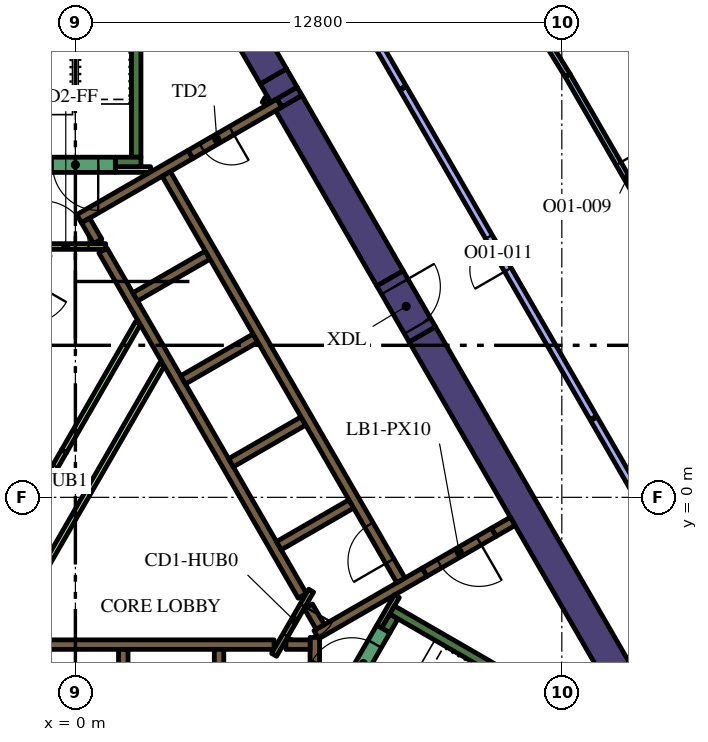
"""IFC4 building model, lengths in metres.
Left out: names, types, materials, properties, quantities, classifications, styles, units other than length and angle.
Written with IfcOpenShell. Run it as: python <this file> out.ifc"""

import sys

from ifc_helpers import new_model, si_unit, direction, frame, frame_2d, origin, place, context, subcontext, project, spatial, polyline, rectangle, outline, extrude, element, fill, save


model = new_model("IFC4")
c1 = context("Model", 3, precision=1e-05, world=origin(), true_north=direction((0.0, 1.0)))
c2 = subcontext(c1, "Body", "Model", "MODEL_VIEW")
j1 = project(units=[si_unit("LENGTHUNIT", "METRE"), si_unit("PLANEANGLEUNIT", "RADIAN")], contexts=[c1])
p1 = place(None, origin())
s1 = spatial("IfcSite", under=j1, at=p1, CompositionType="ELEMENT")
p2 = place(p1, origin())
s2 = spatial("IfcBuilding", under=s1, at=p2, CompositionType="ELEMENT")
p3 = place(p2, frame((0.0, 0.0, 150.0)))
s3 = spatial("IfcBuildingStorey", under=s2, at=p3, CompositionType="ELEMENT", Elevation=150.0)
p4 = place(p3, frame((9.129, 4.289, 0.0), z_axis=(0.0, 0.0, 1.0), x_axis=(0.499995742806, -0.866027861663, 0.0)))
e1 = element("IfcWall", 1, at=p4, inside=s3, PredefinedType="SOLIDWALL", context=c2, shape_type="SweptSolid", body=[
    extrude(rectangle(XDim=12.527, YDim=0.8, at=frame_2d((6.264, 0.0))), origin(), (0.0, 0.0, 1.0), 4.2),
])
p5 = place(p3, frame((5.489, 10.594, 0.0), z_axis=(0.0, 0.0, 1.0), x_axis=(-0.500000383388, 0.866025182435, 0.0)))
e2 = element("IfcWall", 2, at=p5, inside=s3, PredefinedType="SOLIDWALL", context=c2, shape_type="SweptSolid", body=[
    extrude(rectangle(XDim=0.558, YDim=0.8, at=frame_2d((0.279, 0.0))), origin(), (0.0, 0.0, 1.0), 4.2),
])
p6 = place(p3, frame((5.615, 10.375, 0.0), z_axis=(0.0, 0.0, 1.0), x_axis=(0.500002746266, -0.866023818221, 0.0)))
e3 = element("IfcWall", 3, at=p6, inside=s3, PredefinedType="SOLIDWALL", context=c2, shape_type="SweptSolid", body=[
    extrude(rectangle(XDim=5.328, YDim=0.8, at=frame_2d((2.664, 0.0))), origin(), (0.0, 0.0, 1.0), 4.2),
])
p7 = place(p3, origin())
e4 = element("IfcWall", 4, at=p7, inside=s3, PredefinedType="SOLIDWALL", context=c2, shape_type="SweptSolid", body=[
    extrude(outline(polyline([(5.432, 10.272), (5.308, 10.487), (5.836, 10.792), (5.96, 10.577), (5.432, 10.272)])), origin(), (0.0, 0.0, 1.0), 4.2),
])
p8 = place(p3, frame((5.209, 11.078, 0.0), z_axis=(0.0, 0.0, 1.0), x_axis=(-0.500035624827, 0.866004834804, 0.0)))
e5 = element("IfcWall", 5, at=p8, inside=s3, PredefinedType="SOLIDWALL", context=c2, shape_type="SweptSolid", body=[
    extrude(rectangle(XDim=6.388, YDim=0.8, at=frame_2d((3.194, 0.0))), origin(), (0.0, 0.0, 1.0), 4.2),
])
p9 = place(p3, frame((8.334, -2.964, 0.0), z_axis=(0.0, 0.0, 1.0), x_axis=(0.866016039709, -0.500016218704, 0.0)))
e6 = element("IfcWall", 6, at=p9, inside=s3, PredefinedType="SOLIDWALL", context=c2, shape_type="SweptSolid", body=[
    extrude(rectangle(XDim=7.05, YDim=0.25, at=frame_2d((3.525, 0.0))), origin(), (0.0, 0.0, 1.0), 4.2),
])
p10 = place(p3, frame((8.168, -3.503, 0.0), z_axis=(0.0, 0.0, 1.0), x_axis=(0.49972245349, 0.866185586049, 0.0)))
e7 = element("IfcWall", 7, at=p10, inside=s3, PredefinedType="SOLIDWALL", context=c2, shape_type="SweptSolid", body=[
    extrude(rectangle(XDim=0.425, YDim=0.25, at=frame_2d((0.212, 0.0))), origin(), (0.0, 0.0, 1.0), 4.2),
])
p11 = place(p3, frame((1.6, 8.95, 0.0), z_axis=(0.0, 0.0, 1.0), x_axis=(0.0, 1.0, 0.0)))
e8 = element("IfcWall", 8, at=p11, inside=s3, PredefinedType="SOLIDWALL", context=c2, shape_type="SweptSolid", body=[
    extrude(rectangle(XDim=6.8, YDim=0.25, at=frame_2d((3.4, 0.0))), origin(), (0.0, 0.0, 1.0), 4.2),
])
p12 = place(p3, frame((1.05, 8.825, 0.0), z_axis=(0.0, 0.0, 1.0), x_axis=(1.0, 0.0, 0.0)))
e9 = element("IfcWall", 9, at=p12, inside=s3, PredefinedType="SOLIDWALL", context=c2, shape_type="SweptSolid", body=[
    extrude(rectangle(XDim=0.675, YDim=0.25, at=frame_2d((0.337, 0.0))), origin(), (0.0, 0.0, 1.0), 4.2),
])
p13 = place(p3, frame((-5.259, -3.875, 0.0), z_axis=(0.0, 0.0, 1.0), x_axis=(1.0, 0.0, 0.0)))
e10 = element("IfcWall", 10, at=p13, inside=s3, PredefinedType="SOLIDWALL", context=c2, shape_type="SweptSolid", body=[
    extrude(rectangle(XDim=10.489, YDim=0.25, at=frame_2d((5.244, 0.0))), origin(), (0.0, 0.0, 1.0), 4.2),
])
for number, where, z_axis, x_axis in (
    (11, (3.78, -4.0, 0.0), (0.0, 0.0, 1.0), (0.0, -1.0, 0.0)),
    (12, (1.26, -4.0, 0.0), (0.0, 0.0, 1.0), (0.0, -1.0, 0.0)),
):
    element("IfcWall", number, at=place(p3, frame(where, z_axis=z_axis, x_axis=x_axis)), inside=s3, PredefinedType="SOLIDWALL", context=c2, shape_type="SweptSolid", body=[
        extrude(rectangle(XDim=2.2, YDim=0.25, at=frame_2d((1.1, 0.0))), origin(), (0.0, 0.0, 1.0), 4.2),
    ])
p14 = place(p3, frame((6.3, -7.24, 0.0), z_axis=(0.0, 0.0, 1.0), x_axis=(0.0, 1.0, 0.0)))
e13 = element("IfcWall", 13, at=p14, inside=s3, PredefinedType="SOLIDWALL", context=c2, shape_type="SweptSolid", body=[
    extrude(rectangle(XDim=3.556, YDim=0.25, at=frame_2d((1.778, 0.0))), origin(), (0.0, 0.0, 1.0), 4.2),
])
p15 = place(p3, frame((5.538, -3.875, 0.0), z_axis=(0.0, 0.0, 1.0), x_axis=(1.0, 0.0, 0.0)))
e14 = element("IfcWall", 14, at=p15, inside=s3, PredefinedType="SOLIDWALL", context=c2, shape_type="SweptSolid", body=[
    extrude(rectangle(XDim=0.637, YDim=0.25, at=frame_2d((0.318, 0.0))), origin(), (0.0, 0.0, 1.0), 4.2),
])
p16 = place(p3, frame((9.19, -1.969, 0.0), z_axis=(0.0, 0.0, 1.0), x_axis=(-0.866057109641, -0.499945079824, 0.0)))
e15 = element("IfcWall", 15, at=p16, inside=s3, PredefinedType="SOLIDWALL", context=c2, shape_type="SweptSolid", body=[
    extrude(rectangle(XDim=3.291, YDim=0.25, at=frame_2d((1.646, 0.0))), origin(), (0.0, 0.0, 1.0), 4.2),
])
p17 = place(p3, frame((6.13, -2.867, 0.0), z_axis=(0.0, 0.0, 1.0), x_axis=(0.500160776593, -0.865932559475, 0.0)))
e16 = element("IfcWall", 16, at=p17, inside=s3, PredefinedType="SOLIDWALL", context=c2, shape_type="SweptSolid", body=[
    extrude(rectangle(XDim=0.627, YDim=0.25, at=frame_2d((0.313, 0.0))), origin(), (0.0, 0.0, 1.0), 4.2),
])
p18 = place(p3, frame((11.507, -0.631, 0.0), z_axis=(0.0, 0.0, 1.0), x_axis=(-0.866093731455, -0.499881634324, 0.0)))
e17 = element("IfcWall", 17, at=p18, inside=s3, PredefinedType="SOLIDWALL", context=c2, shape_type="SweptSolid", body=[
    extrude(rectangle(XDim=0.575, YDim=0.25, at=frame_2d((0.288, 0.0))), origin(), (0.0, 0.0, 1.0), 4.2),
])
p19 = place(p3, frame((3.028, 9.023, 0.0), z_axis=(0.0, 0.0, 1.0), x_axis=(-0.866036587186, -0.49998062928, 0.0)))
e18 = element("IfcWall", 18, at=p19, inside=s3, PredefinedType="SOLIDWALL", context=c2, shape_type="SweptSolid", body=[
    extrude(rectangle(XDim=3.384, YDim=0.25, at=frame_2d((1.692, 0.0))), origin(), (0.0, 0.0, 1.0), 4.2),
])
p20 = place(p3, frame((0.268, 7.285, 0.0), z_axis=(0.0, 0.0, 1.0), x_axis=(0.500098681536, -0.865968422476, 0.0)))
e19 = element("IfcWall", 19, at=p20, inside=s3, PredefinedType="SOLIDWALL", context=c2, shape_type="SweptSolid", body=[
    extrude(rectangle(XDim=0.636, YDim=0.25, at=frame_2d((0.318, 0.0))), origin(), (0.0, 0.0, 1.0), 4.2),
])
p21 = place(p3, frame((5.97, -2.591, 0.0), z_axis=(0.0, 0.0, 1.0), x_axis=(-0.499994469932, 0.866028596547, 0.0)))
e20 = element("IfcWall", 20, at=p21, inside=s3, PredefinedType="SOLIDWALL", context=c2, shape_type="SweptSolid", body=[
    extrude(rectangle(XDim=10.488, YDim=0.25, at=frame_2d((5.244, 0.0))), origin(), (0.0, 0.0, 1.0), 4.2),
])
p22 = place(p3, frame((1.574, 5.274, 0.0), z_axis=(0.0, 0.0, 1.0), x_axis=(0.866028486751, 0.499994660107, 0.0)))
e21 = element("IfcWall", 21, at=p22, inside=s3, PredefinedType="SOLIDWALL", context=c2, shape_type="SweptSolid", body=[
    extrude(rectangle(XDim=2.2, YDim=0.25, at=frame_2d((1.1, 0.0))), origin(), (0.0, 0.0, 1.0), 4.2),
])
for number, where, z_axis, x_axis in (
    (22, (2.834, 3.091, 0.0), (0.0, 0.0, 1.0), (0.866, 0.5, 0.0)),
    (23, (4.094, 0.909, 0.0), (0.0, 0.0, 1.0), (0.866, 0.5, 0.0)),
    (24, (5.354, -1.274, 0.0), (0.0, 0.0, 1.0), (0.866, 0.5, 0.0)),
):
    element("IfcWall", number, at=place(p3, frame(where, z_axis=z_axis, x_axis=x_axis)), inside=s3, PredefinedType="SOLIDWALL", context=c2, shape_type="SweptSolid", body=[
        extrude(rectangle(XDim=2.2, YDim=0.25, at=frame_2d((1.1, 0.0))), origin(), (0.0, 0.0, 1.0), 4.2),
    ])
p23 = place(p3, frame((1.05, 8.625, 0.0), z_axis=(0.0, 0.0, 1.0), x_axis=(1.0, 0.0, 0.0)))
e25 = element("IfcWall", 25, at=p23, inside=s3, PredefinedType="PARTITIONING", context=c2, shape_type="SweptSolid", body=[
    extrude(rectangle(XDim=0.929, YDim=0.15, at=frame_2d((0.464, 0.0))), origin(), (0.0, 0.0, 1.0), 3.15),
])
p24 = place(p3, frame((4.98, 10.358, 0.0), z_axis=(0.0, 0.0, 1.0), x_axis=(0.500640202437, 0.86565546709, 0.0)))
e26 = element("IfcWall", 26, at=p24, inside=s3, PredefinedType="PARTITIONING", context=c2, shape_type="SweptSolid", body=[
    extrude(rectangle(XDim=0.146, YDim=0.15, at=frame_2d((0.073, 0.0))), origin(), (0.0, 0.0, 1.0), 3.15),
])
p25 = place(p3, frame((8.459, -2.599, 0.0), z_axis=(0.0, 0.0, 1.0), x_axis=(-0.500041054325, -0.866001699761, 0.0)))
e27 = element("IfcWall", 27, at=p25, inside=s3, PredefinedType="PARTITIONING", context=c2, shape_type="SweptSolid", body=[
    extrude(rectangle(XDim=0.929, YDim=0.15, at=frame_2d((0.464, 0.0))), origin(), (0.0, 0.0, 1.0), 4.2),
])
p26 = place(p3, frame((-1.887, -3.718, 0.0), z_axis=(0.0, 0.0, 1.0), x_axis=(0.500005008002, 0.866022512394, 0.0)))
e28 = element("IfcWall", 28, at=p26, inside=s3, PredefinedType="PARTITIONING", context=c2, shape_type="SweptSolid", body=[
    extrude(rectangle(XDim=8.327, YDim=0.15, at=frame_2d((4.164, 0.0))), origin(), (0.0, 0.0, 1.0), 3.15),
])
p27 = place(p3, frame((-0.3, 1.212, 0.0), z_axis=(0.0, 0.0, 1.0), x_axis=(0.499963101113, 0.866046706318, 0.0)))
e29 = element("IfcWall", 29, at=p27, inside=s3, PredefinedType="PARTITIONING", context=c2, shape_type="SweptSolid", body=[
    extrude(rectangle(XDim=3.893, YDim=0.15, at=frame_2d((1.947, 0.0))), origin(), (0.0, 0.0, 1.0), 3.15),
])
p28 = place(p3, frame((8.565, -2.185, 0.0), z_axis=(0.0, 0.0, 1.0), x_axis=(-0.499997954832, 0.866026584559, 0.0)))
e30 = element("IfcWall", 30, at=p28, inside=s3, PredefinedType="SOLIDWALL", context=c2, shape_type="SweptSolid", body=[
    extrude(rectangle(XDim=12.35, YDim=0.25, at=frame_2d((6.175, 0.0))), origin(), (0.0, 0.0, 1.0), 4.2),
])
p29 = place(p28, frame((0.585, 0.0, 0.0)))
e31 = element("IfcOpeningElement", 31, at=p29, cuts=e30, PredefinedType="OPENING", context=c2, shape_type="SweptSolid", body=[
    extrude(rectangle(XDim=1.1, YDim=2.1, at=frame_2d((0.55, 1.05))), frame((0.0, 0.135, 0.0), z_axis=(0.0, -1.0, 0.0), x_axis=(1.0, 0.0, 0.0)), (0.0, 0.0, 1.0), 0.27),
])
p30 = place(p3, frame((7.053, -5.284, 0.0), z_axis=(0.0, 0.0, 1.0), x_axis=(0.500078061341, 0.865980330357, 0.0)))
e32 = element("IfcWall", 32, at=p30, inside=s3, PredefinedType="SOLIDWALL", context=c2, shape_type="SweptSolid", body=[
    extrude(rectangle(XDim=2.1, YDim=0.4, at=frame_2d((1.05, 0.0))), origin(), (0.0, 0.0, 1.0), 4.2),
])
p31 = place(p30, frame((0.45, 0.0, 0.0)))
e33 = element("IfcOpeningElement", 33, at=p31, cuts=e32, PredefinedType="OPENING", context=c2, shape_type="SweptSolid", body=[
    extrude(rectangle(XDim=1.2, YDim=2.1, at=frame_2d((0.6, 1.05))), frame((0.0, 0.21, 0.0), z_axis=(0.0, -1.0, 0.0), x_axis=(1.0, 0.0, 0.0)), (0.0, 0.0, 1.0), 0.42),
])
p32 = place(p3, frame((1.05, 8.75, 0.0), z_axis=(0.0, 0.0, 1.0), x_axis=(-1.0, 0.0, 0.0)))
e34 = element("IfcWall", 34, at=p32, inside=s3, PredefinedType="SOLIDWALL", context=c2, shape_type="SweptSolid", body=[
    extrude(rectangle(XDim=2.1, YDim=0.4, at=frame_2d((1.05, 0.0))), origin(), (0.0, 0.0, 1.0), 4.2),
])
p33 = place(p32, frame((0.45, 0.0, 0.0)))
e35 = element("IfcOpeningElement", 35, at=p33, cuts=e34, PredefinedType="OPENING", context=c2, shape_type="SweptSolid", body=[
    extrude(rectangle(XDim=1.2, YDim=2.1, at=frame_2d((0.6, 1.05))), frame((0.0, 0.21, 0.0), z_axis=(0.0, -1.0, 0.0), x_axis=(1.0, 0.0, 0.0)), (0.0, 0.0, 1.0), 0.42),
])
p34 = place(p3, frame((5.366, 10.373, 0.0), z_axis=(0.0, 0.0, 1.0), x_axis=(-0.866019956843, -0.50000943426, 0.0)))
e36 = element("IfcWall", 36, at=p34, inside=s3, PredefinedType="SOLIDWALL", context=c2, shape_type="SweptSolid", body=[
    extrude(rectangle(XDim=2.7, YDim=0.25, at=frame_2d((1.35, 0.0))), origin(), (0.0, 0.0, 1.0), 4.2),
])
p35 = place(p34, frame((1.45, 0.0, 0.0)))
e37 = element("IfcOpeningElement", 37, at=p35, cuts=e36, PredefinedType="OPENING", context=c2, shape_type="SweptSolid", body=[
    extrude(rectangle(XDim=0.9, YDim=2.1, at=frame_2d((0.45, 1.05))), frame((0.0, 0.135, 0.0), z_axis=(0.0, -1.0, 0.0), x_axis=(1.0, 0.0, 0.0)), (0.0, 0.0, 1.0), 0.27),
])
p36 = place(p3, frame((6.203, -2.456, 0.0), z_axis=(0.0, 0.0, 1.0), x_axis=(-0.500043961785, -0.866000020948, 0.0)))
e38 = element("IfcWall", 38, at=p36, inside=s3, PredefinedType="PARTITIONING", context=c2, shape_type="SweptSolid", body=[
    extrude(rectangle(XDim=1.95, YDim=0.15, at=frame_2d((0.975, 0.0))), origin(), (0.0, 0.0, 1.0), 4.2),
])
p37 = place(p36, frame((0.45, 0.0, 0.0)))
e39 = element("IfcOpeningElement", 39, at=p37, cuts=e38, PredefinedType="OPENING", context=c2, shape_type="SweptSolid", body=[
    extrude(rectangle(XDim=0.9, YDim=2.1, at=frame_2d((0.45, 1.05))), frame((0.0, 0.085, 0.0), z_axis=(0.0, -1.0, 0.0), x_axis=(1.0, 0.0, 0.0)), (0.0, 0.0, 1.0), 0.17),
])
p38 = place(p3, frame((-1.303, 6.6, 0.0), z_axis=(0.0, 0.0, 1.0), x_axis=(1.0, 0.0, 0.0)))
e40 = element("IfcWall", 40, at=p38, inside=s3, PredefinedType="PARTITIONING", context=c2, shape_type="SweptSolid", body=[
    extrude(rectangle(XDim=2.1, YDim=0.15, at=frame_2d((1.05, 0.0))), origin(), (0.0, 0.0, 1.0), 4.2),
])
p39 = place(p38, frame((0.45, 0.0, 0.0)))
e41 = element("IfcOpeningElement", 41, at=p39, cuts=e40, PredefinedType="OPENING", context=c2, shape_type="SweptSolid", body=[
    extrude(rectangle(XDim=1.2, YDim=2.1, at=frame_2d((0.6, 1.05))), frame((0.0, 0.085, 0.0), z_axis=(0.0, -1.0, 0.0), x_axis=(1.0, 0.0, 0.0)), (0.0, 0.0, 1.0), 0.17),
])
p40 = place(p3, frame((11.009, -0.919, 0.0), z_axis=(0.0, 0.0, 1.0), x_axis=(-0.866059744384, -0.49994051562, 0.0)))
e42 = element("IfcWall", 42, at=p40, inside=s3, PredefinedType="SOLIDWALL", context=c2, shape_type="SweptSolid", body=[
    extrude(rectangle(XDim=2.1, YDim=0.25, at=frame_2d((1.05, 0.0))), origin(), (0.0, 0.0, 1.0), 4.2),
])
p41 = place(p40, frame((0.45, 0.0, 0.0)))
e43 = element("IfcOpeningElement", 43, at=p41, cuts=e42, PredefinedType="OPENING", context=c2, shape_type="SweptSolid", body=[
    extrude(rectangle(XDim=1.2, YDim=2.1, at=frame_2d((0.6, 1.05))), frame((0.0, 0.135, 0.0), z_axis=(0.0, -1.0, 0.0), x_axis=(1.0, 0.0, 0.0)), (0.0, 0.0, 1.0), 0.27),
])
p42 = place(p3, frame((8.279, 5.761, 0.0), z_axis=(0.0, 0.0, 1.0), x_axis=(0.500062241894, -0.865989465428, 0.0)))
e44 = element("IfcWall", 44, at=p42, inside=s3, PredefinedType="SOLIDWALL", context=c2, shape_type="SweptSolid", body=[
    extrude(rectangle(XDim=1.7, YDim=0.8, at=frame_2d((0.85, 0.0))), origin(), (0.0, 0.0, 1.0), 4.2),
])
p43 = place(p42, frame((0.25, 0.0, 0.0)))
e45 = element("IfcOpeningElement", 45, at=p43, cuts=e44, PredefinedType="OPENING", context=c2, shape_type="SweptSolid", body=[
    extrude(rectangle(XDim=1.2, YDim=2.1, at=frame_2d((0.6, 1.05))), frame((0.0, 0.41, 0.0), z_axis=(0.0, -1.0, 0.0), x_axis=(1.0, 0.0, 0.0)), (0.0, 0.0, 1.0), 0.82),
])
p44 = place(p3, frame((-1.2, -0.346, 0.0), z_axis=(0.0, 0.0, 1.0), x_axis=(0.499961193289, 0.866047807691, 0.0)))
e46 = element("IfcWall", 46, at=p44, inside=s3, PredefinedType="PARTITIONING", context=c2, shape_type="SweptSolid", body=[
    extrude(rectangle(XDim=1.8, YDim=0.15, at=frame_2d((0.9, 0.0))), origin(), (0.0, 0.0, 1.0), 3.15),
])
p45 = place(p44, frame((0.45, 0.0, 0.0)))
e47 = element("IfcOpeningElement", 47, at=p45, cuts=e46, PredefinedType="OPENING", context=c2, shape_type="SweptSolid", body=[
    extrude(rectangle(XDim=0.9, YDim=2.1, at=frame_2d((0.45, 1.05))), frame((0.0, 0.085, 0.0), z_axis=(0.0, -1.0, 0.0), x_axis=(1.0, 0.0, 0.0)), (0.0, 0.0, 1.0), 0.17),
])
p46 = place(p3, frame((12.951, 11.104, 0.0), z_axis=(0.0, 0.0, 1.0), x_axis=(0.499992691614, -0.866029623242, 0.0)))
e48 = element("IfcWall", 48, at=p46, inside=s3, PredefinedType="PARTITIONING", context=c2, shape_type="SweptSolid", body=[
    extrude(rectangle(XDim=6.282, YDim=0.15, at=frame_2d((3.141, 0.0))), origin(), (0.0, 0.0, 1.0), 3.15),
])
p47 = place(p46, frame((2.683, 0.0, 0.0)))
e49 = element("IfcOpeningElement", 49, at=p47, cuts=e48, PredefinedType="OPENING", context=c2, shape_type="SweptSolid", body=[
    extrude(rectangle(XDim=0.9, YDim=2.1, at=frame_2d((0.45, 1.05))), frame((0.0, 0.085, 0.0), z_axis=(0.0, -1.0, 0.0), x_axis=(1.0, 0.0, 0.0)), (0.0, 0.0, 1.0), 0.17),
])
p48 = place(p3, frame((12.951, 11.104, 0.0), z_axis=(0.0, 0.0, 1.0), x_axis=(-0.526204763311, 0.850357893518, 0.0)))
e50 = element("IfcWall", 50, at=p48, inside=s3, PredefinedType="PARTITIONING", context=c2, shape_type="SweptSolid", body=[
    extrude(rectangle(XDim=3.197, YDim=0.15, at=frame_2d((1.599, 0.0))), origin(), (0.0, 0.0, 1.0), 3.15),
])
p49 = place(p3, frame((13.63, 2.091, 0.0), z_axis=(0.0, 0.0, 1.0), x_axis=(-0.499990634175, 0.866030811078, 0.0)))
e51 = element("IfcWall", 51, at=p49, inside=s3, PredefinedType="PARTITIONING", context=c2, shape_type="SweptSolid", body=[
    extrude(rectangle(XDim=10.008, YDim=0.2, at=frame_2d((5.004, 0.0))), origin(), (0.0, 0.0, 1.0), 3.15),
])
p50 = place(p49, frame((4.5, 0.0, 0.0)))
e52 = element("IfcOpeningElement", 52, at=p50, cuts=e51, PredefinedType="OPENING", context=c2, shape_type="SweptSolid", body=[
    extrude(rectangle(XDim=1.0, YDim=2.1, at=frame_2d((0.5, 1.05))), frame((0.0, 0.11, 0.0), z_axis=(0.0, -1.0, 0.0), x_axis=(1.0, 0.0, 0.0)), (0.0, 0.0, 1.0), 0.22),
])
p51 = place(p3, frame((8.611, 10.785, 0.0), z_axis=(0.0, 0.0, 1.0), x_axis=(-0.499987928593, 0.866032373102, 0.0)))
e53 = element("IfcWall", 53, at=p51, inside=s3, PredefinedType="PARTITIONING", context=c2, shape_type="SweptSolid", body=[
    extrude(rectangle(XDim=8.889, YDim=0.2, at=frame_2d((4.445, 0.0))), origin(), (0.0, 0.0, 1.0), 3.15),
])
p52 = place(p3, frame((18.504, -6.35, 0.0), z_axis=(0.0, 0.0, 1.0), x_axis=(-0.499995029582, 0.866028273438, 0.0)))
e54 = element("IfcWall", 54, at=p52, inside=s3, PredefinedType="PARTITIONING", context=c2, shape_type="SweptSolid", body=[
    extrude(rectangle(XDim=9.717, YDim=0.2, at=frame_2d((4.859, 0.0))), origin(), (0.0, 0.0, 1.0), 3.15),
])
p53 = place(p29, origin())
e55 = element("IfcDoor", 55, at=p53, inside=s3, OperationType="DOUBLE_DOOR_SLIDING", PredefinedType="DOOR", context=c2, shape_type="SweptSolid", body=[
    extrude(rectangle(XDim=1.1, YDim=2.1, at=frame_2d((0.55, 1.05))), frame((0.0, 0.025, 0.0), z_axis=(0.0, -1.0, 0.0), x_axis=(1.0, 0.0, 0.0)), (0.0, 0.0, 1.0), 0.05),
])
fill(e31, e55)
p54 = place(p31, origin())
e56 = element("IfcDoor", 56, at=p54, inside=s3, OperationType="SINGLE_SWING_LEFT", PredefinedType="DOOR", context=c2, shape_type="SweptSolid", body=[
    extrude(rectangle(XDim=1.2, YDim=2.1, at=frame_2d((0.6, 1.05))), frame((0.0, 0.025, 0.0), z_axis=(0.0, -1.0, 0.0), x_axis=(1.0, 0.0, 0.0)), (0.0, 0.0, 1.0), 0.05),
])
fill(e33, e56)
p55 = place(p33, origin())
e57 = element("IfcDoor", 57, at=p55, inside=s3, OperationType="SINGLE_SWING_LEFT", PredefinedType="DOOR", context=c2, shape_type="SweptSolid", body=[
    extrude(rectangle(XDim=1.2, YDim=2.1, at=frame_2d((0.6, 1.05))), frame((0.0, 0.025, 0.0), z_axis=(0.0, -1.0, 0.0), x_axis=(1.0, 0.0, 0.0)), (0.0, 0.0, 1.0), 0.05),
])
fill(e35, e57)
p56 = place(p35, origin())
e58 = element("IfcDoor", 58, at=p56, inside=s3, OperationType="SINGLE_SWING_LEFT", PredefinedType="DOOR", context=c2, shape_type="SweptSolid", body=[
    extrude(rectangle(XDim=0.9, YDim=2.1, at=frame_2d((0.45, 1.05))), frame((0.0, 0.025, 0.0), z_axis=(0.0, -1.0, 0.0), x_axis=(1.0, 0.0, 0.0)), (0.0, 0.0, 1.0), 0.05),
])
fill(e37, e58)
p57 = place(p37, origin())
e59 = element("IfcDoor", 59, at=p57, inside=s3, OperationType="SINGLE_SWING_LEFT", PredefinedType="DOOR", context=c2, shape_type="SweptSolid", body=[
    extrude(rectangle(XDim=0.9, YDim=2.1, at=frame_2d((0.45, 1.05))), frame((0.0, 0.025, 0.0), z_axis=(0.0, -1.0, 0.0), x_axis=(1.0, 0.0, 0.0)), (0.0, 0.0, 1.0), 0.05),
])
fill(e39, e59)
p58 = place(p39, origin())
e60 = element("IfcDoor", 60, at=p58, inside=s3, OperationType="SINGLE_SWING_LEFT", PredefinedType="DOOR", context=c2, shape_type="SweptSolid", body=[
    extrude(rectangle(XDim=1.2, YDim=2.1, at=frame_2d((0.6, 1.05))), frame((0.0, 0.025, 0.0), z_axis=(0.0, -1.0, 0.0), x_axis=(1.0, 0.0, 0.0)), (0.0, 0.0, 1.0), 0.05),
])
fill(e41, e60)
p59 = place(p41, origin())
e61 = element("IfcDoor", 61, at=p59, inside=s3, OperationType="SINGLE_SWING_LEFT", PredefinedType="DOOR", context=c2, shape_type="SweptSolid", body=[
    extrude(rectangle(XDim=1.2, YDim=2.1, at=frame_2d((0.6, 1.05))), frame((0.0, 0.025, 0.0), z_axis=(0.0, -1.0, 0.0), x_axis=(1.0, 0.0, 0.0)), (0.0, 0.0, 1.0), 0.05),
])
fill(e43, e61)
p60 = place(p43, origin())
e62 = element("IfcDoor", 62, at=p60, inside=s3, OperationType="SINGLE_SWING_LEFT", PredefinedType="DOOR", context=c2, shape_type="SweptSolid", body=[
    extrude(rectangle(XDim=1.2, YDim=2.1, at=frame_2d((0.6, 1.05))), frame((0.0, 0.025, 0.0), z_axis=(0.0, -1.0, 0.0), x_axis=(1.0, 0.0, 0.0)), (0.0, 0.0, 1.0), 0.05),
])
fill(e45, e62)
p61 = place(p45, origin())
e63 = element("IfcDoor", 63, at=p61, inside=s3, OperationType="SINGLE_SWING_LEFT", PredefinedType="DOOR", context=c2, shape_type="SweptSolid", body=[
    extrude(rectangle(XDim=0.9, YDim=2.1, at=frame_2d((0.45, 1.05))), frame((0.0, 0.025, 0.0), z_axis=(0.0, -1.0, 0.0), x_axis=(1.0, 0.0, 0.0)), (0.0, 0.0, 1.0), 0.05),
])
fill(e47, e63)
p62 = place(p47, origin())
e64 = element("IfcDoor", 64, at=p62, inside=s3, OperationType="SINGLE_SWING_LEFT", PredefinedType="DOOR", context=c2, shape_type="SweptSolid", body=[
    extrude(rectangle(XDim=0.9, YDim=2.1, at=frame_2d((0.45, 1.05))), frame((0.0, 0.025, 0.0), z_axis=(0.0, -1.0, 0.0), x_axis=(1.0, 0.0, 0.0)), (0.0, 0.0, 1.0), 0.05),
])
fill(e49, e64)
p63 = place(p50, origin())
e65 = element("IfcDoor", 65, at=p63, inside=s3, OperationType="SINGLE_SWING_LEFT", PredefinedType="DOOR", context=c2, shape_type="SweptSolid", body=[
    extrude(rectangle(XDim=1.0, YDim=2.1, at=frame_2d((0.5, 1.05))), frame((0.0, 0.025, 0.0), z_axis=(0.0, -1.0, 0.0), x_axis=(1.0, 0.0, 0.0)), (0.0, 0.0, 1.0), 0.05),
])
fill(e52, e65)
save(model, sys.argv[1])
